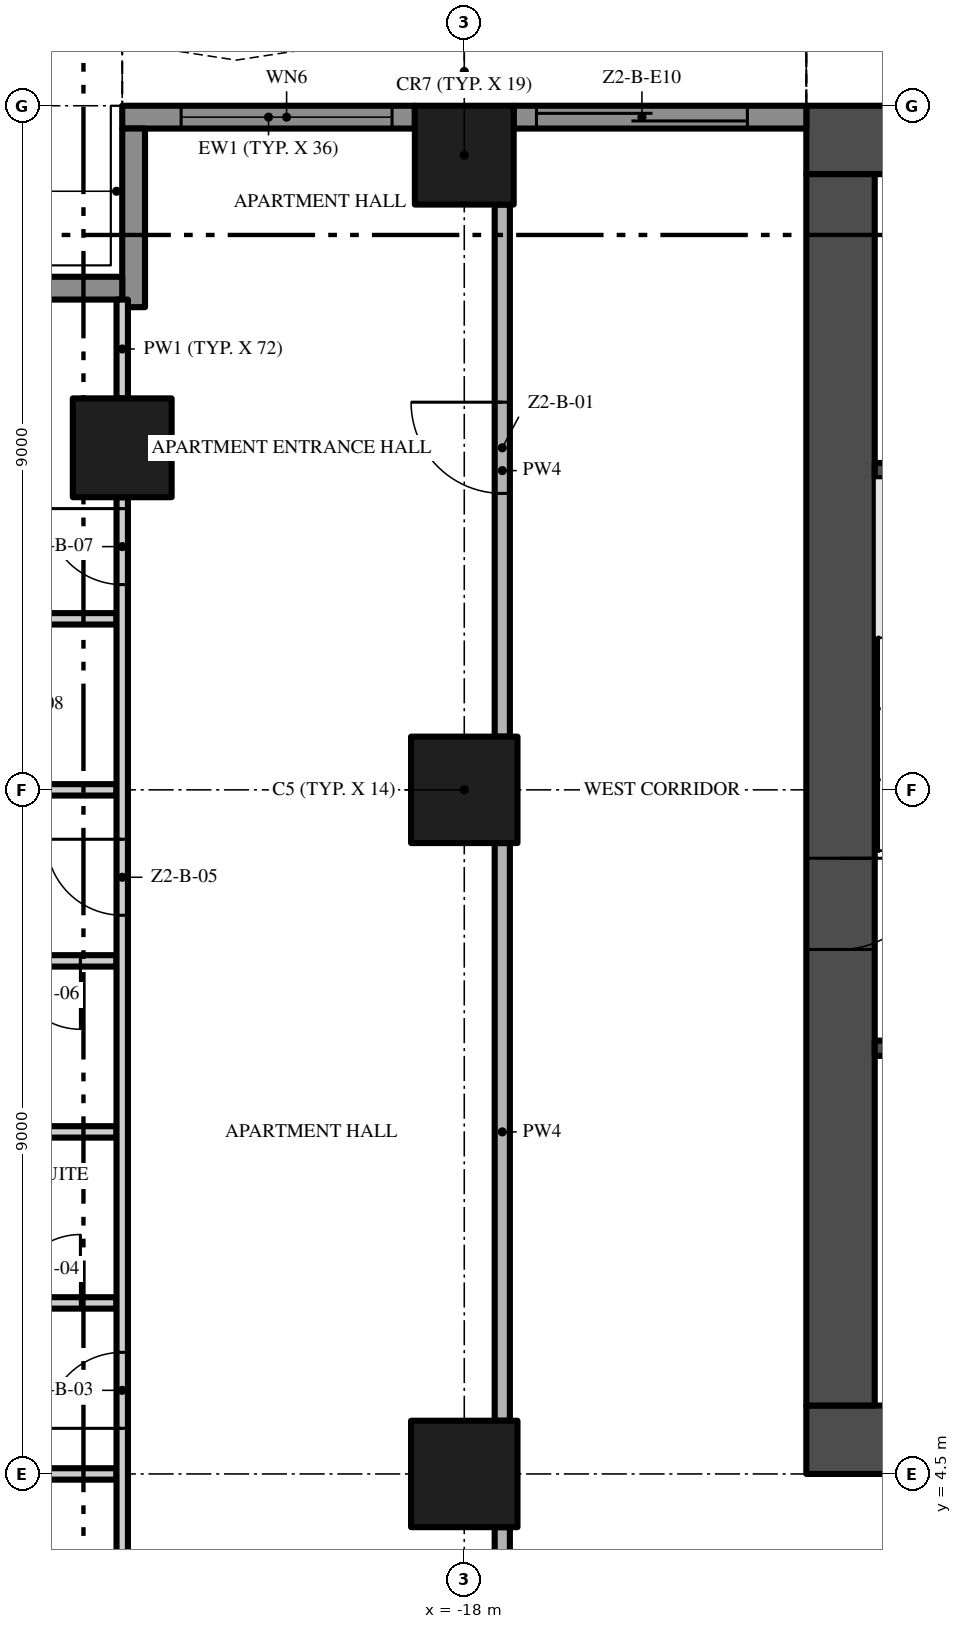
"""IFC4 building model, lengths in metres.
Left out: names, types, materials, properties, quantities, classifications, styles, units other than length and angle.
Written with IfcOpenShell. Run it as: python <this file> out.ifc"""

import sys

from ifc_helpers import new_model, si_unit, direction, frame, frame_2d, origin, origin_2d, place, context, subcontext, project, spatial, polyline, rectangle, outline, extrude, element, fill, save


model = new_model("IFC4")
c1 = context("Model", 3, precision=1e-05, world=origin(), true_north=direction((0.0, 1.0)))
c2 = subcontext(c1, "Body", "Model", "MODEL_VIEW")
j1 = project(units=[si_unit("LENGTHUNIT", "METRE"), si_unit("PLANEANGLEUNIT", "RADIAN")], contexts=[c1])
p1 = place(None, origin())
s1 = spatial("IfcSite", under=j1, at=p1, CompositionType="ELEMENT")
p2 = place(p1, origin())
s2 = spatial("IfcBuilding", under=s1, at=p2, CompositionType="ELEMENT")
p3 = place(p2, frame((0.0, 0.0, 84.6)))
s3 = spatial("IfcBuildingStorey", under=s2, at=p3, CompositionType="ELEMENT", Elevation=84.6)
p4 = place(p3, frame((-13.5, 4.95, -0.3), z_axis=(0.0, 0.0, 1.0), x_axis=(1.0, 0.0, 0.0)))
e1 = element("IfcWall", 1, at=p4, inside=s3, PredefinedType="SHEAR", context=c2, shape_type="SweptSolid", body=[
    extrude(rectangle(XDim=27.0, YDim=0.9, at=frame_2d((13.5, 0.0))), origin(), (0.0, 0.0, 1.0), 3.8),
])
p5 = place(p4, frame((12.0, 0.0, 0.3)))
e2 = element("IfcOpeningElement", 2, at=p5, cuts=e1, PredefinedType="OPENING", context=c2, shape_type="SweptSolid", body=[
    extrude(rectangle(XDim=3.0, YDim=2.4, at=frame_2d((1.5, 1.2))), frame((0.0, 0.46, 0.0), z_axis=(0.0, -1.0, 0.0), x_axis=(1.0, 0.0, 0.0)), (0.0, 0.0, 1.0), 0.92),
])
p6 = place(p4, frame((4.9, 0.0, 0.3)))
e3 = element("IfcOpeningElement", 3, at=p6, cuts=e1, PredefinedType="OPENING", context=c2, shape_type="SweptSolid", body=[
    extrude(rectangle(XDim=1.2, YDim=2.2, at=frame_2d((0.6, 1.1))), frame((0.0, 0.46, 0.0), z_axis=(0.0, -1.0, 0.0), x_axis=(1.0, 0.0, 0.0)), (0.0, 0.0, 1.0), 0.92),
])
p7 = place(p4, frame((20.75, 0.0, 0.3)))
e4 = element("IfcOpeningElement", 4, at=p7, cuts=e1, PredefinedType="OPENING", context=c2, shape_type="SweptSolid", body=[
    extrude(rectangle(XDim=1.5, YDim=2.2, at=frame_2d((0.75, 1.1))), frame((0.0, 0.46, 0.0), z_axis=(0.0, -1.0, 0.0), x_axis=(1.0, 0.0, 0.0)), (0.0, 0.0, 1.0), 0.92),
])
p8 = place(p4, frame((17.4, 0.0, 0.3)))
e5 = element("IfcOpeningElement", 5, at=p8, cuts=e1, PredefinedType="OPENING", context=c2, shape_type="SweptSolid", body=[
    extrude(rectangle(XDim=1.2, YDim=2.2, at=frame_2d((0.6, 1.1))), frame((0.0, 0.46, 0.0), z_axis=(0.0, -1.0, 0.0), x_axis=(1.0, 0.0, 0.0)), (0.0, 0.0, 1.0), 0.92),
])
p9 = place(p3, frame((13.5, 22.05, -0.3), z_axis=(0.0, 0.0, 1.0), x_axis=(-1.0, 0.0, 0.0)))
e6 = element("IfcWall", 6, at=p9, inside=s3, PredefinedType="SHEAR", context=c2, shape_type="SweptSolid", body=[
    extrude(rectangle(XDim=27.0, YDim=0.9, at=frame_2d((13.5, 0.0))), origin(), (0.0, 0.0, 1.0), 3.8),
])
p10 = place(p3, frame((-13.05, 21.6, -0.3), z_axis=(0.0, 0.0, 1.0), x_axis=(0.0, -1.0, 0.0)))
e7 = element("IfcWall", 7, at=p10, inside=s3, PredefinedType="SHEAR", context=c2, shape_type="SweptSolid", body=[
    extrude(rectangle(XDim=16.2, YDim=0.9, at=frame_2d((8.1, 0.0))), origin(), (0.0, 0.0, 1.0), 3.8),
])
p11 = place(p10, frame((9.0, 0.0, 0.3)))
e8 = element("IfcOpeningElement", 8, at=p11, cuts=e7, PredefinedType="OPENING", context=c2, shape_type="SweptSolid", body=[
    extrude(rectangle(XDim=1.2, YDim=2.2, at=frame_2d((0.6, 1.1))), frame((0.0, 0.46, 0.0), z_axis=(0.0, -1.0, 0.0), x_axis=(1.0, 0.0, 0.0)), (0.0, 0.0, 1.0), 0.92),
])
p12 = place(p3, frame((-18.0, 13.5, 0.0), z_axis=(0.0, 0.0, 1.0), x_axis=(1.0, 0.0, 0.0)))
e9 = element("IfcColumn", 9, at=p12, inside=s3, PredefinedType="COLUMN", context=c2, shape_type="SweptSolid", body=[
    extrude(rectangle(XDim=1.4, YDim=1.4, at=origin_2d()), origin(), (0.0, 0.0, 1.0), 3.5),
])
p13 = place(p3, frame((-18.0, 21.85, 0.0), z_axis=(0.0, 0.0, 1.0), x_axis=(1.0, 0.0, 0.0)))
e10 = element("IfcColumn", 10, at=p13, inside=s3, PredefinedType="COLUMN", context=c2, shape_type="SweptSolid", body=[
    extrude(rectangle(XDim=1.3, YDim=1.3, at=origin_2d()), origin(), (0.0, 0.0, 1.0), 3.5),
])
p14 = place(p3, frame((-18.0, 4.5, 0.0), z_axis=(0.0, 0.0, 1.0), x_axis=(1.0, 0.0, 0.0)))
e11 = element("IfcColumn", 11, at=p14, inside=s3, PredefinedType="COLUMN", context=c2, shape_type="SweptSolid", body=[
    extrude(rectangle(XDim=1.4, YDim=1.4, at=origin_2d()), origin(), (0.0, 0.0, 1.0), 3.5),
])
p15 = place(p3, frame((-22.5, 18.0, 0.0), z_axis=(0.0, 0.0, 1.0), x_axis=(1.0, 0.0, 0.0)))
e12 = element("IfcColumn", 12, at=p15, inside=s3, PredefinedType="COLUMN", context=c2, shape_type="SweptSolid", body=[
    extrude(rectangle(XDim=1.3, YDim=1.3, at=origin_2d()), origin(), (0.0, 0.0, 1.0), 3.5),
])
p16 = place(p3, frame((-17.35, 22.35, 0.0), z_axis=(0.0, 0.0, 1.0), x_axis=(1.0, 0.0, 0.0)))
e13 = element("IfcWall", 13, at=p16, inside=s3, PredefinedType="SOLIDWALL", context=c2, shape_type="SweptSolid", body=[
    extrude(rectangle(XDim=3.85, YDim=0.3, at=frame_2d((1.925, 0.0))), origin(), (0.0, 0.0, 1.0), 3.5),
])
p17 = place(p16, frame((0.3, 0.0, 0.0)))
e14 = element("IfcOpeningElement", 14, at=p17, cuts=e13, PredefinedType="OPENING", context=c2, shape_type="SweptSolid", body=[
    extrude(rectangle(XDim=2.775, YDim=2.4, at=frame_2d((1.387, 1.2))), frame((0.0, 0.16, 0.0), z_axis=(0.0, -1.0, 0.0), x_axis=(1.0, 0.0, 0.0)), (0.0, 0.0, 1.0), 0.32),
])
p18 = place(p3, frame((-22.5, 22.35, 0.0), z_axis=(0.0, 0.0, 1.0), x_axis=(1.0, 0.0, 0.0)))
e15 = element("IfcWall", 15, at=p18, inside=s3, PredefinedType="SOLIDWALL", context=c2, shape_type="SweptSolid", body=[
    extrude(rectangle(XDim=3.85, YDim=0.3, at=frame_2d((1.925, 0.0))), origin(), (0.0, 0.0, 1.0), 3.5),
])
p19 = place(p18, frame((0.775, 0.0, 0.45)))
e16 = element("IfcOpeningElement", 16, at=p19, cuts=e15, PredefinedType="OPENING", context=c2, shape_type="SweptSolid", body=[
    extrude(rectangle(XDim=2.775, YDim=2.65, at=frame_2d((1.387, 1.325))), frame((0.0, 0.16, 0.0), z_axis=(0.0, -1.0, 0.0), x_axis=(1.0, 0.0, 0.0)), (0.0, 0.0, 1.0), 0.32),
])
p20 = place(p3, frame((-22.35, 19.85, 0.0), z_axis=(0.0, 0.0, 1.0), x_axis=(0.0, 1.0, 0.0)))
e17 = element("IfcWall", 17, at=p20, inside=s3, PredefinedType="SOLIDWALL", context=c2, shape_type="SweptSolid", body=[
    extrude(rectangle(XDim=2.35, YDim=0.3, at=frame_2d((1.175, 0.0))), origin(), (0.0, 0.0, 1.0), 3.5),
])
p21 = place(p3, frame((-24.75, 20.1, 0.0), z_axis=(0.0, 0.0, 1.0), x_axis=(1.0, 0.0, 0.0)))
e18 = element("IfcWall", 18, at=p21, inside=s3, PredefinedType="SOLIDWALL", context=c2, shape_type="SweptSolid", body=[
    extrude(rectangle(XDim=2.25, YDim=0.3, at=frame_2d((1.125, 0.0))), origin(), (0.0, 0.0, 1.0), 3.5),
])
p22 = place(p3, origin())
e19 = element("IfcWall", 19, at=p22, inside=s3, PredefinedType="USERDEFINED", context=c2, shape_type="SweptSolid", body=[
    extrude(outline(polyline([(-13.5, 25.5), (-15.0, 25.271), (-16.5, 24.671), (-18.0, 23.929), (-19.5, 23.329), (-21.0, 23.1), (-22.5, 23.329), (-22.538, 23.082), (-21.0, 22.847), (-19.434, 23.086), (-17.898, 23.701), (-16.398, 24.442), (-14.934, 25.028), (-13.462, 25.253), (-13.5, 25.5)])), origin(), (0.0, 0.0, 1.0), 0.9),
])
for number, where, z_axis, x_axis in (
    (20, (-12.6, 10.1, 0.0), (0.0, 0.0, 1.0), (1.0, 0.0, 0.0)),
    (21, (-12.6, 17.7, 0.0), (0.0, 0.0, 1.0), (1.0, 0.0, 0.0)),
):
    element("IfcWall", number, at=place(p3, frame(where, z_axis=z_axis, x_axis=x_axis)), inside=s3, PredefinedType="SHEAR", context=c2, shape_type="SweptSolid", body=[
        extrude(rectangle(XDim=2.95, YDim=0.2, at=frame_2d((1.475, 0.0))), origin(), (0.0, 0.0, 1.0), 3.5),
    ])
p23 = place(p3, frame((-25.7, 4.5, 0.0), z_axis=(0.0, 0.0, 1.0), x_axis=(1.0, 0.0, 0.0)))
e22 = element("IfcWall", 22, at=p23, inside=s3, PredefinedType="PARTITIONING", context=c2, shape_type="SweptSolid", body=[
    extrude(rectangle(XDim=3.125, YDim=0.15, at=frame_2d((1.562, 0.0))), origin(), (0.0, 0.0, 1.0), 3.5),
])
p24 = place(p3, frame((-24.45, 6.75, 0.0), z_axis=(0.0, 0.0, 1.0), x_axis=(1.0, 0.0, 0.0)))
e23 = element("IfcWall", 23, at=p24, inside=s3, PredefinedType="PARTITIONING", context=c2, shape_type="SweptSolid", body=[
    extrude(rectangle(XDim=1.875, YDim=0.15, at=frame_2d((0.938, 0.0))), origin(), (0.0, 0.0, 1.0), 3.5),
])
p25 = place(p24, frame((0.5, 0.0, 0.0)))
e24 = element("IfcOpeningElement", 24, at=p25, cuts=e23, PredefinedType="OPENING", context=c2, shape_type="SweptSolid", body=[
    extrude(rectangle(XDim=0.9, YDim=2.1, at=frame_2d((0.45, 1.05))), frame((0.0, 0.085, 0.0), z_axis=(0.0, -1.0, 0.0), x_axis=(1.0, 0.0, 0.0)), (0.0, 0.0, 1.0), 0.17),
])
p26 = place(p3, frame((-24.45, 9.0, 0.0), z_axis=(0.0, 0.0, 1.0), x_axis=(1.0, 0.0, 0.0)))
e25 = element("IfcWall", 25, at=p26, inside=s3, PredefinedType="PARTITIONING", context=c2, shape_type="SweptSolid", body=[
    extrude(rectangle(XDim=1.875, YDim=0.15, at=frame_2d((0.938, 0.0))), origin(), (0.0, 0.0, 1.0), 3.5),
])
p27 = place(p3, frame((-22.575, 11.25, 0.0), z_axis=(0.0, 0.0, 1.0), x_axis=(-1.0, 0.0, 0.0)))
e26 = element("IfcWall", 26, at=p27, inside=s3, PredefinedType="PARTITIONING", context=c2, shape_type="SweptSolid", body=[
    extrude(rectangle(XDim=1.875, YDim=0.15, at=frame_2d((0.938, 0.0))), origin(), (0.0, 0.0, 1.0), 3.5),
])
p28 = place(p27, frame((0.475, 0.0, 0.0)))
e27 = element("IfcOpeningElement", 27, at=p28, cuts=e26, PredefinedType="OPENING", context=c2, shape_type="SweptSolid", body=[
    extrude(rectangle(XDim=0.9, YDim=2.1, at=frame_2d((0.45, 1.05))), frame((0.0, 0.085, 0.0), z_axis=(0.0, -1.0, 0.0), x_axis=(1.0, 0.0, 0.0)), (0.0, 0.0, 1.0), 0.17),
])
p29 = place(p3, frame((-25.7, 13.5, 0.0), z_axis=(0.0, 0.0, 1.0), x_axis=(1.0, 0.0, 0.0)))
e28 = element("IfcWall", 28, at=p29, inside=s3, PredefinedType="PARTITIONING", context=c2, shape_type="SweptSolid", body=[
    extrude(rectangle(XDim=3.125, YDim=0.15, at=frame_2d((1.562, 0.0))), origin(), (0.0, 0.0, 1.0), 3.5),
])
p30 = place(p3, frame((-24.45, 15.75, 0.0), z_axis=(0.0, 0.0, 1.0), x_axis=(1.0, 0.0, 0.0)))
e29 = element("IfcWall", 29, at=p30, inside=s3, PredefinedType="PARTITIONING", context=c2, shape_type="SweptSolid", body=[
    extrude(rectangle(XDim=1.875, YDim=0.15, at=frame_2d((0.938, 0.0))), origin(), (0.0, 0.0, 1.0), 3.5),
])
p31 = place(p3, frame((-22.5, 0.1, 0.0), z_axis=(0.0, 0.0, 1.0), x_axis=(0.0, 1.0, 0.0)))
e30 = element("IfcWall", 30, at=p31, inside=s3, PredefinedType="PARTITIONING", context=c2, shape_type="SweptSolid", body=[
    extrude(rectangle(XDim=17.25, YDim=0.15, at=frame_2d((8.625, 0.0))), origin(), (0.0, 0.0, 1.0), 3.5),
])
p32 = place(p31, frame((1.65, 0.0, 0.0)))
e31 = element("IfcOpeningElement", 31, at=p32, cuts=e30, PredefinedType="OPENING", context=c2, shape_type="SweptSolid", body=[
    extrude(rectangle(XDim=1.0, YDim=2.4, at=frame_2d((0.5, 1.2))), frame((0.0, 0.085, 0.0), z_axis=(0.0, -1.0, 0.0), x_axis=(1.0, 0.0, 0.0)), (0.0, 0.0, 1.0), 0.17),
])
p33 = place(p31, frame((5.0, 0.0, 0.0)))
e32 = element("IfcOpeningElement", 32, at=p33, cuts=e30, PredefinedType="OPENING", context=c2, shape_type="SweptSolid", body=[
    extrude(rectangle(XDim=1.0, YDim=2.4, at=frame_2d((0.5, 1.2))), frame((0.0, 0.085, 0.0), z_axis=(0.0, -1.0, 0.0), x_axis=(1.0, 0.0, 0.0)), (0.0, 0.0, 1.0), 0.17),
])
p34 = place(p31, frame((11.75, 0.0, 0.0)))
e33 = element("IfcOpeningElement", 33, at=p34, cuts=e30, PredefinedType="OPENING", context=c2, shape_type="SweptSolid", body=[
    extrude(rectangle(XDim=1.0, YDim=2.4, at=frame_2d((0.5, 1.2))), frame((0.0, 0.085, 0.0), z_axis=(0.0, -1.0, 0.0), x_axis=(1.0, 0.0, 0.0)), (0.0, 0.0, 1.0), 0.17),
])
p35 = place(p31, frame((16.1, 0.0, 0.0)))
e34 = element("IfcOpeningElement", 34, at=p35, cuts=e30, PredefinedType="OPENING", context=c2, shape_type="SweptSolid", body=[
    extrude(rectangle(XDim=1.0, YDim=2.4, at=frame_2d((0.5, 1.2))), frame((0.0, 0.085, 0.0), z_axis=(0.0, -1.0, 0.0), x_axis=(1.0, 0.0, 0.0)), (0.0, 0.0, 1.0), 0.17),
])
p36 = place(p3, frame((-22.5, 18.65, 0.0), z_axis=(0.0, 0.0, 1.0), x_axis=(0.0, 1.0, 0.0)))
e35 = element("IfcWall", 35, at=p36, inside=s3, PredefinedType="PARTITIONING", context=c2, shape_type="SweptSolid", body=[
    extrude(rectangle(XDim=1.3, YDim=0.15, at=frame_2d((0.65, 0.0))), origin(), (0.0, 0.0, 1.0), 3.5),
])
p37 = place(p3, frame((-17.5, -0.2, 0.0), z_axis=(0.0, 0.0, 1.0), x_axis=(0.0, 1.0, 0.0)))
e36 = element("IfcWall", 36, at=p37, inside=s3, PredefinedType="PARTITIONING", context=c2, shape_type="SweptSolid", body=[
    extrude(rectangle(XDim=4.0, YDim=0.2, at=frame_2d((2.0, 0.0))), origin(), (0.0, 0.0, 1.0), 3.5),
])
p38 = place(p3, frame((-17.5, 5.2, 0.0), z_axis=(0.0, 0.0, 1.0), x_axis=(0.0, 1.0, 0.0)))
e37 = element("IfcWall", 37, at=p38, inside=s3, PredefinedType="PARTITIONING", context=c2, shape_type="SweptSolid", body=[
    extrude(rectangle(XDim=7.6, YDim=0.2, at=frame_2d((3.8, 0.0))), origin(), (0.0, 0.0, 1.0), 3.5),
])
p39 = place(p3, frame((-17.5, 14.2, 0.0), z_axis=(0.0, 0.0, 1.0), x_axis=(0.0, 1.0, 0.0)))
e38 = element("IfcWall", 38, at=p39, inside=s3, PredefinedType="PARTITIONING", context=c2, shape_type="SweptSolid", body=[
    extrude(rectangle(XDim=7.0, YDim=0.2, at=frame_2d((3.5, 0.0))), origin(), (0.0, 0.0, 1.0), 3.5),
])
p40 = place(p39, frame((3.2, 0.0, 0.0)))
e39 = element("IfcOpeningElement", 39, at=p40, cuts=e38, PredefinedType="OPENING", context=c2, shape_type="SweptSolid", body=[
    extrude(rectangle(XDim=1.2, YDim=2.4, at=frame_2d((0.6, 1.2))), frame((0.0, 0.11, 0.0), z_axis=(0.0, -1.0, 0.0), x_axis=(1.0, 0.0, 0.0)), (0.0, 0.0, 1.0), 0.22),
])
p41 = place(p17, origin())
e40 = element("IfcDoor", 40, at=p41, inside=s3, OperationType="SINGLE_SWING_LEFT", PredefinedType="DOOR", context=c2, shape_type="SweptSolid", body=[
    extrude(rectangle(XDim=2.775, YDim=2.4, at=frame_2d((1.387, 1.2))), frame((0.0, 0.025, 0.0), z_axis=(0.0, -1.0, 0.0), x_axis=(1.0, 0.0, 0.0)), (0.0, 0.0, 1.0), 0.05),
])
fill(e14, e40)
p42 = place(p19, origin())
e41 = element("IfcWindow", 41, at=p42, inside=s3, PartitioningType="SINGLE_PANEL", PredefinedType="WINDOW", context=c2, shape_type="SweptSolid", body=[
    extrude(rectangle(XDim=2.775, YDim=2.65, at=frame_2d((1.387, 1.325))), frame((0.0, 0.03, 0.0), z_axis=(0.0, -1.0, 0.0), x_axis=(1.0, 0.0, 0.0)), (0.0, 0.0, 1.0), 0.06),
])
fill(e16, e41)
p43 = place(p11, frame((1.2, 0.0, 0.0), z_axis=(0.0, 0.0, 1.0), x_axis=(-1.0, 0.0, 0.0)))
e42 = element("IfcDoor", 42, at=p43, inside=s3, OperationType="SINGLE_SWING_RIGHT", PredefinedType="DOOR", context=c2, shape_type="SweptSolid", body=[
    extrude(rectangle(XDim=1.2, YDim=2.2, at=frame_2d((0.6, 1.1))), frame((0.0, 0.025, 0.0), z_axis=(0.0, -1.0, 0.0), x_axis=(1.0, 0.0, 0.0)), (0.0, 0.0, 1.0), 0.05),
])
fill(e8, e42)
p44 = place(p40, origin())
e43 = element("IfcDoor", 43, at=p44, inside=s3, OperationType="SINGLE_SWING_RIGHT", PredefinedType="DOOR", context=c2, shape_type="SweptSolid", body=[
    extrude(rectangle(XDim=1.2, YDim=2.4, at=frame_2d((0.6, 1.2))), frame((0.0, 0.025, 0.0), z_axis=(0.0, -1.0, 0.0), x_axis=(1.0, 0.0, 0.0)), (0.0, 0.0, 1.0), 0.05),
])
fill(e39, e43)
p45 = place(p33, origin())
e44 = element("IfcDoor", 44, at=p45, inside=s3, OperationType="SINGLE_SWING_LEFT", PredefinedType="DOOR", context=c2, shape_type="SweptSolid", body=[
    extrude(rectangle(XDim=1.0, YDim=2.4, at=frame_2d((0.5, 1.2))), frame((0.0, 0.025, 0.0), z_axis=(0.0, -1.0, 0.0), x_axis=(1.0, 0.0, 0.0)), (0.0, 0.0, 1.0), 0.05),
])
fill(e32, e44)
p46 = place(p25, origin())
e45 = element("IfcDoor", 45, at=p46, inside=s3, OperationType="SINGLE_SWING_RIGHT", PredefinedType="DOOR", context=c2, shape_type="SweptSolid", body=[
    extrude(rectangle(XDim=0.9, YDim=2.1, at=frame_2d((0.45, 1.05))), frame((0.0, 0.025, 0.0), z_axis=(0.0, -1.0, 0.0), x_axis=(1.0, 0.0, 0.0)), (0.0, 0.0, 1.0), 0.05),
])
fill(e24, e45)
p47 = place(p34, origin())
e46 = element("IfcDoor", 46, at=p47, inside=s3, OperationType="SINGLE_SWING_RIGHT", PredefinedType="DOOR", context=c2, shape_type="SweptSolid", body=[
    extrude(rectangle(XDim=1.0, YDim=2.4, at=frame_2d((0.5, 1.2))), frame((0.0, 0.025, 0.0), z_axis=(0.0, -1.0, 0.0), x_axis=(1.0, 0.0, 0.0)), (0.0, 0.0, 1.0), 0.05),
])
fill(e33, e46)
p48 = place(p28, origin())
e47 = element("IfcDoor", 47, at=p48, inside=s3, OperationType="SINGLE_SWING_LEFT", PredefinedType="DOOR", context=c2, shape_type="SweptSolid", body=[
    extrude(rectangle(XDim=0.9, YDim=2.1, at=frame_2d((0.45, 1.05))), frame((0.0, 0.025, 0.0), z_axis=(0.0, -1.0, 0.0), x_axis=(1.0, 0.0, 0.0)), (0.0, 0.0, 1.0), 0.05),
])
fill(e27, e47)
p49 = place(p35, origin())
e48 = element("IfcDoor", 48, at=p49, inside=s3, OperationType="SINGLE_SWING_RIGHT", PredefinedType="DOOR", context=c2, shape_type="SweptSolid", body=[
    extrude(rectangle(XDim=1.0, YDim=2.4, at=frame_2d((0.5, 1.2))), frame((0.0, 0.025, 0.0), z_axis=(0.0, -1.0, 0.0), x_axis=(1.0, 0.0, 0.0)), (0.0, 0.0, 1.0), 0.05),
])
fill(e34, e48)
save(model, sys.argv[1])
